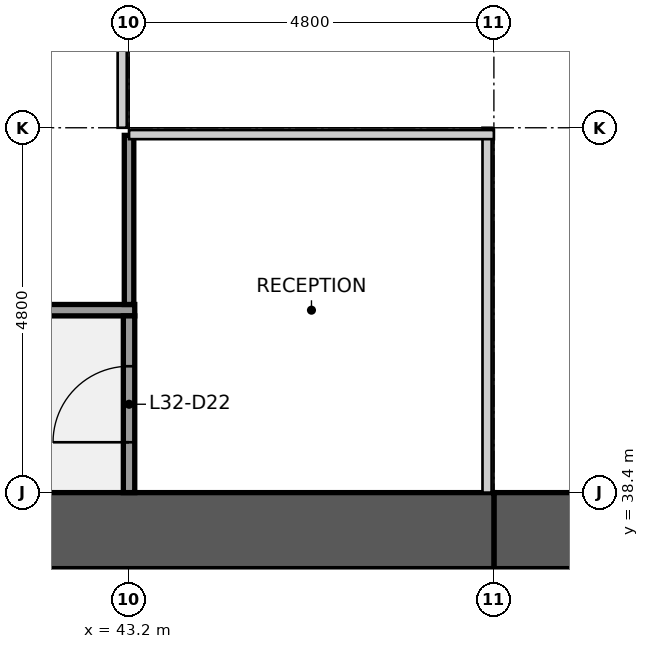
"""IFC4 building model, lengths in metres.
Left out: names, types, materials, properties, quantities, classifications, styles, units other than length and angle.
Written with IfcOpenShell. Run it as: python <this file> out.ifc"""

import sys

from ifc_helpers import new_model, si_unit, direction, frame, frame_2d, origin, place, context, subcontext, project, spatial, rectangle, extrude, element, fill, save


model = new_model("IFC4")
c1 = context("Model", 3, precision=1e-05, world=origin(), true_north=direction((0.0, 1.0)))
c2 = subcontext(c1, "Body", "Model", "MODEL_VIEW")
j1 = project(units=[si_unit("LENGTHUNIT", "METRE"), si_unit("PLANEANGLEUNIT", "RADIAN")], contexts=[c1])
p1 = place(None, origin())
s1 = spatial("IfcSite", under=j1, at=p1, CompositionType="ELEMENT")
p2 = place(p1, origin())
s2 = spatial("IfcBuilding", under=s1, at=p2, CompositionType="ELEMENT")
p3 = place(p2, frame((0.0, 0.0, 148.1)))
s3 = spatial("IfcBuildingStorey", under=s2, at=p3, CompositionType="ELEMENT", Elevation=148.1)
p4 = place(p3, frame((48.0, 37.3, 0.0), z_axis=(0.0, 0.0, 1.0), x_axis=(1.0, 0.0, 0.0)))
e1 = element("IfcWall", 1, at=p4, inside=s3, PredefinedType="SHEAR", context=c2, shape_type="SweptSolid", body=[
    extrude(rectangle(XDim=3.35, YDim=0.2, at=frame_2d((1.675, 0.0))), origin(), (0.0, 0.0, 1.0), 3.84),
])
p5 = place(p3, frame((43.85, 37.3, 0.0), z_axis=(0.0, 0.0, 1.0), x_axis=(1.0, 0.0, 0.0)))
e2 = element("IfcWall", 2, at=p5, inside=s3, PredefinedType="SHEAR", context=c2, shape_type="SweptSolid", body=[
    extrude(rectangle(XDim=4.15, YDim=0.2, at=frame_2d((2.075, 0.0))), origin(), (0.0, 0.0, 1.0), 3.84),
])
p6 = place(p3, frame((48.0, 37.9, 0.0), z_axis=(0.0, 0.0, 1.0), x_axis=(1.0, 0.0, 0.0)))
e3 = element("IfcWall", 3, at=p6, inside=s3, PredefinedType="SHEAR", context=c2, shape_type="SweptSolid", body=[
    extrude(rectangle(XDim=8.6, YDim=1.0, at=frame_2d((4.3, 0.0))), origin(), (0.0, 0.0, 1.0), 3.84),
])
p7 = place(p6, frame((1.5, 0.0, 0.9)))
e4 = element("IfcOpeningElement", 4, at=p7, cuts=e3, PredefinedType="OPENING", context=c2, shape_type="SweptSolid", body=[
    extrude(rectangle(XDim=1.8, YDim=1.5, at=frame_2d((0.9, 0.75))), frame((0.0, 0.51, 0.0), z_axis=(0.0, -1.0, 0.0), x_axis=(1.0, 0.0, 0.0)), (0.0, 0.0, 1.0), 1.02),
])
p8 = place(p3, frame((39.4, 37.9, 0.0), z_axis=(0.0, 0.0, 1.0), x_axis=(1.0, 0.0, 0.0)))
e5 = element("IfcWall", 5, at=p8, inside=s3, PredefinedType="SHEAR", context=c2, shape_type="SweptSolid", body=[
    extrude(rectangle(XDim=8.6, YDim=1.0, at=frame_2d((4.3, 0.0))), origin(), (0.0, 0.0, 1.0), 3.84),
])
p9 = place(p8, frame((0.85, 0.0, 0.0)))
e6 = element("IfcOpeningElement", 6, at=p9, cuts=e5, PredefinedType="OPENING", context=c2, shape_type="SweptSolid", body=[
    extrude(rectangle(XDim=1.1, YDim=2.1, at=frame_2d((0.55, 1.05))), frame((0.0, 0.51, 0.0), z_axis=(0.0, -1.0, 0.0), x_axis=(1.0, 0.0, 0.0)), (0.0, 0.0, 1.0), 1.02),
])
p10 = place(p3, frame((14.325, 40.8, 0.0), z_axis=(0.0, 0.0, 1.0), x_axis=(1.0, 0.0, 0.0)))
e7 = element("IfcWall", 7, at=p10, inside=s3, PredefinedType="PARTITIONING", context=c2, shape_type="SweptSolid", body=[
    extrude(rectangle(XDim=28.95, YDim=0.15, at=frame_2d((14.475, 0.0))), origin(), (0.0, 0.0, 1.0), 2.849),
])
p11 = place(p10, frame((1.975, 0.0, 0.0)))
e8 = element("IfcOpeningElement", 8, at=p11, cuts=e7, PredefinedType="OPENING", context=c2, shape_type="SweptSolid", body=[
    extrude(rectangle(XDim=1.0, YDim=2.1, at=frame_2d((0.5, 1.05))), frame((0.0, 0.085, 0.0), z_axis=(0.0, -1.0, 0.0), x_axis=(1.0, 0.0, 0.0)), (0.0, 0.0, 1.0), 0.17),
])
p12 = place(p10, frame((9.175, 0.0, 0.0)))
e9 = element("IfcOpeningElement", 9, at=p12, cuts=e7, PredefinedType="OPENING", context=c2, shape_type="SweptSolid", body=[
    extrude(rectangle(XDim=1.0, YDim=2.1, at=frame_2d((0.5, 1.05))), frame((0.0, 0.085, 0.0), z_axis=(0.0, -1.0, 0.0), x_axis=(1.0, 0.0, 0.0)), (0.0, 0.0, 1.0), 0.17),
])
p13 = place(p10, frame((15.175, 0.0, 0.0)))
e10 = element("IfcOpeningElement", 10, at=p13, cuts=e7, PredefinedType="OPENING", context=c2, shape_type="SweptSolid", body=[
    extrude(rectangle(XDim=1.0, YDim=2.1, at=frame_2d((0.5, 1.05))), frame((0.0, 0.085, 0.0), z_axis=(0.0, -1.0, 0.0), x_axis=(1.0, 0.0, 0.0)), (0.0, 0.0, 1.0), 0.17),
])
p14 = place(p10, frame((19.975, 0.0, 0.0)))
e11 = element("IfcOpeningElement", 11, at=p14, cuts=e7, PredefinedType="OPENING", context=c2, shape_type="SweptSolid", body=[
    extrude(rectangle(XDim=1.0, YDim=2.1, at=frame_2d((0.5, 1.05))), frame((0.0, 0.085, 0.0), z_axis=(0.0, -1.0, 0.0), x_axis=(1.0, 0.0, 0.0)), (0.0, 0.0, 1.0), 0.17),
])
p15 = place(p10, frame((25.975, 0.0, 0.0)))
e12 = element("IfcOpeningElement", 12, at=p15, cuts=e7, PredefinedType="OPENING", context=c2, shape_type="SweptSolid", body=[
    extrude(rectangle(XDim=1.0, YDim=2.1, at=frame_2d((0.5, 1.05))), frame((0.0, 0.085, 0.0), z_axis=(0.0, -1.0, 0.0), x_axis=(1.0, 0.0, 0.0)), (0.0, 0.0, 1.0), 0.17),
])
p16 = place(p3, frame((43.2, 40.875, 0.0), z_axis=(0.0, 0.0, 1.0), x_axis=(0.0, 1.0, 0.0)))
e13 = element("IfcWall", 13, at=p16, inside=s3, PredefinedType="PARTITIONING", context=c2, shape_type="SweptSolid", body=[
    extrude(rectangle(XDim=2.225, YDim=0.125, at=frame_2d((1.113, 0.0))), origin(), (0.0, 0.0, 1.0), 2.849),
])
p17 = place(p3, frame((43.2, 38.4, 0.0), z_axis=(0.0, 0.0, 1.0), x_axis=(0.0, 1.0, 0.0)))
e14 = element("IfcWall", 14, at=p17, inside=s3, PredefinedType="PARTITIONING", context=c2, shape_type="SweptSolid", body=[
    extrude(rectangle(XDim=2.325, YDim=0.15, at=frame_2d((1.163, 0.0))), origin(), (0.0, 0.0, 1.0), 2.849),
])
p18 = place(p17, frame((0.663, 0.0, 0.0)))
e15 = element("IfcOpeningElement", 15, at=p18, cuts=e14, PredefinedType="OPENING", context=c2, shape_type="SweptSolid", body=[
    extrude(rectangle(XDim=1.0, YDim=2.1, at=frame_2d((0.5, 1.05))), frame((0.0, 0.085, 0.0), z_axis=(0.0, -1.0, 0.0), x_axis=(1.0, 0.0, 0.0)), (0.0, 0.0, 1.0), 0.17),
])
p19 = place(p18, origin())
e16 = element("IfcDoor", 16, at=p19, inside=s3, OperationType="SINGLE_SWING_LEFT", PredefinedType="DOOR", context=c2, shape_type="SweptSolid", body=[
    extrude(rectangle(XDim=1.0, YDim=2.1, at=frame_2d((0.5, 1.05))), frame((0.0, 0.025, 0.0), z_axis=(0.0, -1.0, 0.0), x_axis=(1.0, 0.0, 0.0)), (0.0, 0.0, 1.0), 0.05),
])
fill(e15, e16)
save(model, sys.argv[1])
